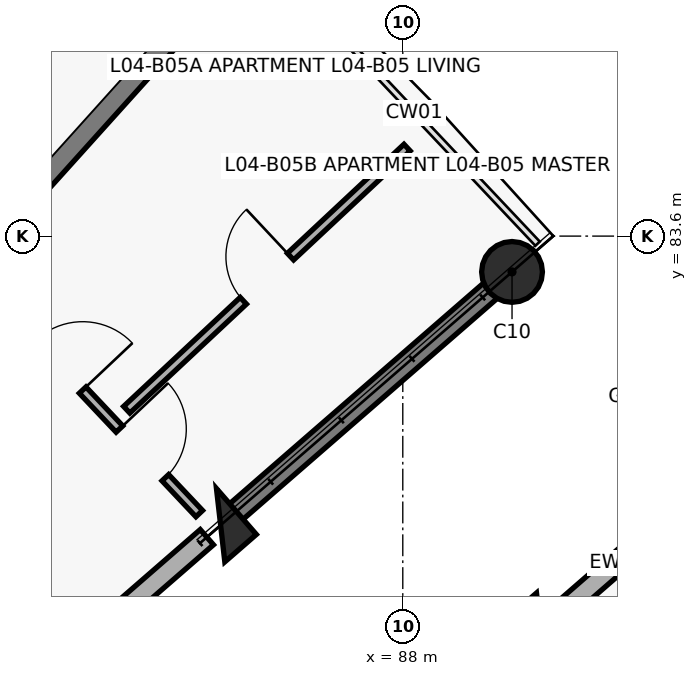
"""IFC4 building model, lengths in metres.
Left out: names, types, materials, properties, quantities, classifications, styles, units other than length and angle.
Written with IfcOpenShell. Run it as: python <this file> out.ifc"""

import sys

from ifc_helpers import new_model, si_unit, direction, frame, frame_2d, origin, origin_2d, place, context, subcontext, project, spatial, rectangle, circle, extrude, element, fill, save


model = new_model("IFC4")
c1 = context("Model", 3, precision=1e-05, world=origin(), true_north=direction((0.0, 1.0)))
c2 = subcontext(c1, "Body", "Model", "MODEL_VIEW")
j1 = project(units=[si_unit("LENGTHUNIT", "METRE"), si_unit("PLANEANGLEUNIT", "RADIAN")], contexts=[c1])
p1 = place(None, origin())
s1 = spatial("IfcSite", under=j1, at=p1, CompositionType="ELEMENT")
p2 = place(p1, origin())
s2 = spatial("IfcBuilding", under=s1, at=p2, CompositionType="ELEMENT")
p3 = place(p2, frame((0.0, 0.0, 14.3)))
s3 = spatial("IfcBuildingStorey", under=s2, at=p3, CompositionType="ELEMENT", Elevation=14.3)
p4 = place(p3, frame((85.603, 79.796, 0.0), z_axis=(0.0, 0.0, 1.0), x_axis=(0.754709580223, 0.656059028991, 0.0)))
e1 = element("IfcColumn", 1, at=p4, inside=s3, PredefinedType="COLUMN", context=c2, shape_type="SweptSolid", body=[
    extrude(rectangle(XDim=0.55, YDim=0.8, at=origin_2d()), origin(), (0.0, 0.0, 1.0), 3.1),
])
p5 = place(p3, frame((89.437, 83.129, 0.0), z_axis=(0.0, 0.0, 1.0), x_axis=(0.754709580223, 0.656059028991, 0.0)))
e2 = element("IfcColumn", 2, at=p5, inside=s3, PredefinedType="COLUMN", context=c2, shape_type="SweptSolid", body=[
    extrude(circle(Radius=0.4, at=origin_2d()), origin(), (0.0, 0.0, 1.0), 3.1),
])
p6 = place(p3, frame((85.739, 79.914, 0.0), z_axis=(0.0, 0.0, 1.0), x_axis=(0.754703505217, 0.65606601742, 0.0)))
e3 = element("IfcWall", 3, at=p6, inside=s3, PredefinedType="SHEAR", context=c2, shape_type="SweptSolid", body=[
    extrude(rectangle(XDim=4.72, YDim=0.27, at=frame_2d((2.36, 0.0))), origin(), (0.0, 0.0, 1.0), 2.86),
])
p7 = place(p3, frame((89.814, 78.422, 0.0), z_axis=(0.0, 0.0, 1.0), x_axis=(-0.754709580223, -0.656059028991, 0.0)))
e4 = element("IfcColumn", 4, at=p7, inside=s3, PredefinedType="COLUMN", context=c2, shape_type="SweptSolid", body=[
    extrude(rectangle(XDim=0.55, YDim=0.8, at=origin_2d()), origin(), (0.0, 0.0, 1.0), 3.1),
])
p8 = place(p3, frame((79.234, 74.259, 0.0), z_axis=(0.0, 0.0, 1.0), x_axis=(0.754717680958, 0.656049710044, 0.0)))
e5 = element("IfcWall", 5, at=p8, inside=s3, PredefinedType="SOLIDWALL", context=c2, shape_type="SweptSolid", body=[
    extrude(rectangle(XDim=8.2, YDim=0.265, at=frame_2d((4.1, 0.0))), origin(), (0.0, 0.0, 1.0), 2.08),
])
p9 = place(p8, frame((3.59, 0.0, 0.75)))
e6 = element("IfcOpeningElement", 6, at=p9, cuts=e5, PredefinedType="OPENING", context=c2, shape_type="SweptSolid", body=[
    extrude(rectangle(XDim=1.35, YDim=1.35, at=frame_2d((0.675, 0.675))), frame((0.0, 0.142, 0.0), z_axis=(0.0, -1.0, 0.0), x_axis=(1.0, 0.0, 0.0)), (0.0, 0.0, 1.0), 0.285),
])
p10 = place(p3, frame((91.746, 80.101, 0.0), z_axis=(0.0, 0.0, 1.0), x_axis=(-0.754704866158, -0.656064451862, 0.0)))
e7 = element("IfcWall", 7, at=p10, inside=s3, PredefinedType="SOLIDWALL", context=c2, shape_type="SweptSolid", body=[
    extrude(rectangle(XDim=8.2, YDim=0.265, at=frame_2d((4.1, 0.0))), origin(), (0.0, 0.0, 1.0), 2.08),
])
p11 = place(p10, frame((3.59, 0.0, 0.75)))
e8 = element("IfcOpeningElement", 8, at=p11, cuts=e7, PredefinedType="OPENING", context=c2, shape_type="SweptSolid", body=[
    extrude(rectangle(XDim=1.35, YDim=1.35, at=frame_2d((0.675, 0.675))), frame((0.0, 0.142, 0.0), z_axis=(0.0, -1.0, 0.0), x_axis=(1.0, 0.0, 0.0)), (0.0, 0.0, 1.0), 0.285),
])
p12 = place(p3, frame((80.309, 81.073, 0.0), z_axis=(0.0, 0.0, 1.0), x_axis=(0.668885797871, 0.743365179038, 0.0)))
e9 = element("IfcWall", 9, at=p12, inside=s3, PredefinedType="SHEAR", context=c2, shape_type="SweptSolid", body=[
    extrude(rectangle(XDim=7.69, YDim=0.3, at=frame_2d((3.845, 0.0))), origin(), (0.0, 0.0, 1.0), 3.1),
])
p13 = place(p3, frame((82.724, 82.701, 0.0), z_axis=(0.0, 0.0, 1.0), x_axis=(0.686331812627, -0.72728855551, 0.0)))
e10 = element("IfcWall", 10, at=p13, inside=s3, PredefinedType="PARTITIONING", context=c2, shape_type="SweptSolid", body=[
    extrude(rectangle(XDim=3.785, YDim=0.12, at=frame_2d((1.893, 0.0))), origin(), (0.0, 0.0, 1.0), 2.08),
])
p14 = place(p13, frame((0.65, 0.0, 0.0)))
e11 = element("IfcOpeningElement", 11, at=p14, cuts=e10, PredefinedType="OPENING", context=c2, shape_type="SweptSolid", body=[
    extrude(rectangle(XDim=0.9, YDim=2.1, at=frame_2d((0.45, 1.05))), frame((0.0, 0.07, 0.0), z_axis=(0.0, -1.0, 0.0), x_axis=(1.0, 0.0, 0.0)), (0.0, 0.0, 1.0), 0.14),
])
p15 = place(p13, frame((2.255, 0.0, 0.0)))
e12 = element("IfcOpeningElement", 12, at=p15, cuts=e10, PredefinedType="OPENING", context=c2, shape_type="SweptSolid", body=[
    extrude(rectangle(XDim=0.88, YDim=2.1, at=frame_2d((0.44, 1.05))), frame((0.0, 0.07, 0.0), z_axis=(0.0, -1.0, 0.0), x_axis=(1.0, 0.0, 0.0)), (0.0, 0.0, 1.0), 0.14),
])
p16 = place(p3, frame((84.368, 81.315, 0.0), z_axis=(0.0, 0.0, 1.0), x_axis=(0.73037487973, 0.683046510173, 0.0)))
e13 = element("IfcWall", 13, at=p16, inside=s3, PredefinedType="PARTITIONING", context=c2, shape_type="SweptSolid", body=[
    extrude(rectangle(XDim=5.05, YDim=0.12, at=frame_2d((2.525, 0.0))), origin(), (0.0, 0.0, 1.0), 2.08),
])
p17 = place(p16, frame((2.1, 0.0, 0.0)))
e14 = element("IfcOpeningElement", 14, at=p17, cuts=e13, PredefinedType="OPENING", context=c2, shape_type="SweptSolid", body=[
    extrude(rectangle(XDim=0.85, YDim=2.1, at=frame_2d((0.425, 1.05))), frame((0.0, 0.07, 0.0), z_axis=(0.0, -1.0, 0.0), x_axis=(1.0, 0.0, 0.0)), (0.0, 0.0, 1.0), 0.14),
])
p18 = place(p14, origin())
e15 = element("IfcDoor", 15, at=p18, inside=s3, OperationType="SINGLE_SWING_RIGHT", PredefinedType="DOOR", context=c2, shape_type="SweptSolid", body=[
    extrude(rectangle(XDim=0.9, YDim=2.1, at=frame_2d((0.45, 1.05))), frame((0.0, 0.025, 0.0), z_axis=(0.0, -1.0, 0.0), x_axis=(1.0, 0.0, 0.0)), (0.0, 0.0, 1.0), 0.05),
])
fill(e11, e15)
p19 = place(p15, origin())
e16 = element("IfcDoor", 16, at=p19, inside=s3, OperationType="SINGLE_SWING_LEFT", PredefinedType="DOOR", context=c2, shape_type="SweptSolid", body=[
    extrude(rectangle(XDim=0.88, YDim=2.1, at=frame_2d((0.44, 1.05))), frame((0.0, 0.025, 0.0), z_axis=(0.0, -1.0, 0.0), x_axis=(1.0, 0.0, 0.0)), (0.0, 0.0, 1.0), 0.05),
])
fill(e12, e16)
p20 = place(p17, origin())
e17 = element("IfcDoor", 17, at=p20, inside=s3, OperationType="SINGLE_SWING_RIGHT", PredefinedType="DOOR", context=c2, shape_type="SweptSolid", body=[
    extrude(rectangle(XDim=0.85, YDim=2.1, at=frame_2d((0.425, 1.05))), frame((0.0, 0.025, 0.0), z_axis=(0.0, -1.0, 0.0), x_axis=(1.0, 0.0, 0.0)), (0.0, 0.0, 1.0), 0.05),
])
fill(e14, e17)
save(model, sys.argv[1])
